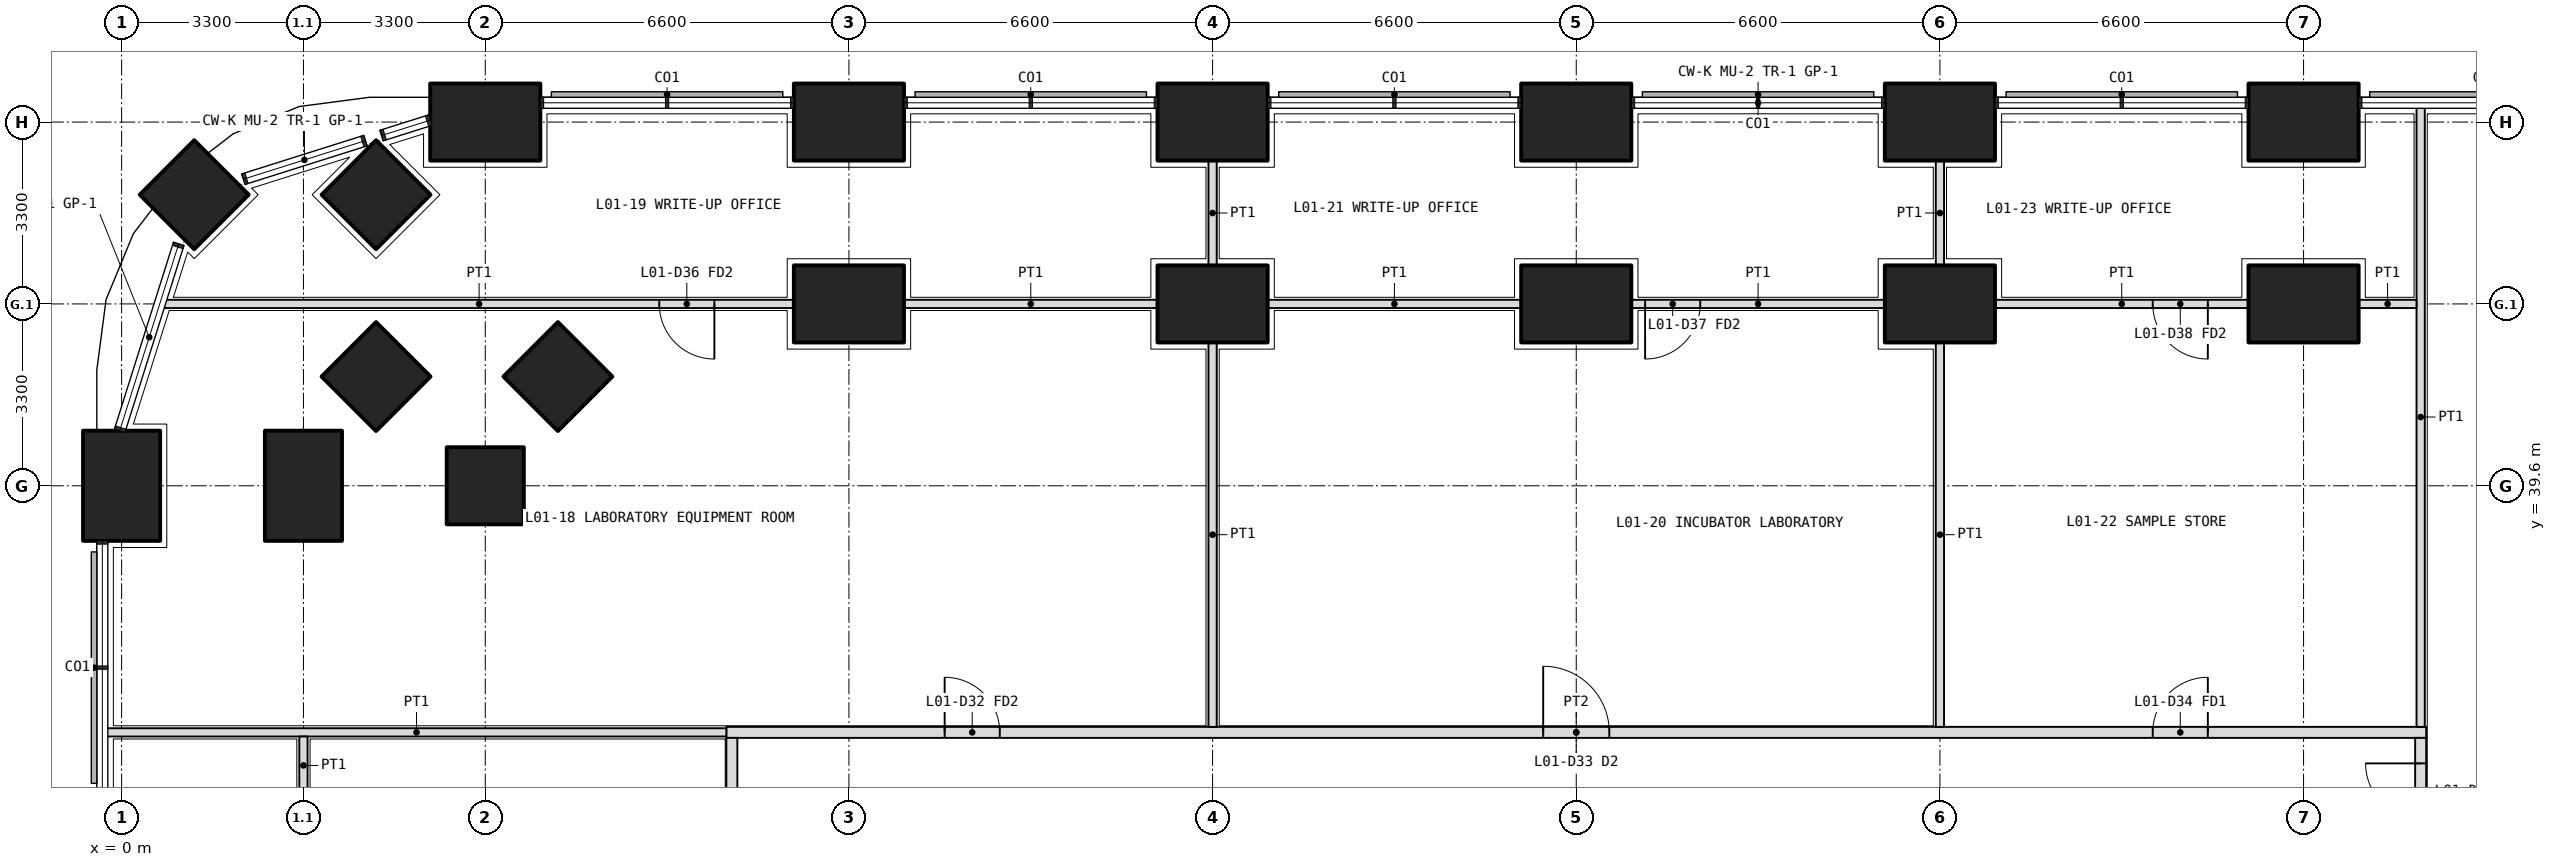
"""IFC4 building model, lengths in metres.
Left out: names, types, materials, properties, quantities, classifications, styles, units other than length and angle.
Written with IfcOpenShell. Run it as: python <this file> out.ifc"""

import sys

from ifc_helpers import new_model, si_unit, direction, frame, frame_2d, origin, origin_2d, place, context, subcontext, project, spatial, rectangle, extrude, element, fill, save


model = new_model("IFC4")
c1 = context("Model", 3, precision=1e-05, world=origin(), true_north=direction((0.0, 1.0)))
c2 = subcontext(c1, "Body", "Model", "MODEL_VIEW")
j1 = project(units=[si_unit("LENGTHUNIT", "METRE"), si_unit("PLANEANGLEUNIT", "RADIAN")], contexts=[c1])
p1 = place(None, origin())
s1 = spatial("IfcSite", under=j1, at=p1, CompositionType="ELEMENT")
p2 = place(p1, origin())
s2 = spatial("IfcBuilding", under=s1, at=p2, CompositionType="ELEMENT")
p3 = place(p2, frame((0.0, 0.0, 7.2)))
s3 = spatial("IfcBuildingStorey", under=s2, at=p3, CompositionType="ELEMENT", Elevation=7.2)
p4 = place(p3, frame((1.318, 44.882, 0.0), z_axis=(0.0, 0.0, 1.0), x_axis=(0.707106781187, 0.707106781187, 0.0)))
e1 = element("IfcColumn", 1, at=p4, inside=s3, PredefinedType="COLUMN", context=c2, shape_type="SweptSolid", body=[
    extrude(rectangle(XDim=1.4, YDim=1.4, at=origin_2d()), origin(), (0.0, 0.0, 1.0), 5.4),
])
for number, where, z_axis, x_axis in (
    (2, (0.0, 39.6, 0.0), (0.0, 0.0, 1.0), (0.0, 1.0, 0.0)),
    (3, (6.6, 46.2, 0.0), (0.0, 0.0, 1.0), (1.0, 0.0, 0.0)),
    (4, (13.2, 46.2, 0.0), (0.0, 0.0, 1.0), (1.0, 0.0, 0.0)),
    (5, (19.8, 46.2, 0.0), (0.0, 0.0, 1.0), (1.0, 0.0, 0.0)),
    (6, (26.4, 46.2, 0.0), (0.0, 0.0, 1.0), (1.0, 0.0, 0.0)),
    (7, (33.0, 46.2, 0.0), (0.0, 0.0, 1.0), (1.0, 0.0, 0.0)),
    (8, (39.6, 46.2, 0.0), (0.0, 0.0, 1.0), (1.0, 0.0, 0.0)),
):
    element("IfcColumn", number, at=place(p3, frame(where, z_axis=z_axis, x_axis=x_axis)), inside=s3, PredefinedType="COLUMN", context=c2, shape_type="SweptSolid", body=[
        extrude(rectangle(XDim=2.0, YDim=1.4, at=origin_2d()), origin(), (0.0, 0.0, 1.0), 5.4),
    ])
for number, where, z_axis, x_axis in (
    (9, (6.6, 39.6, 0.0), (0.0, 0.0, 1.0), (1.0, 0.0, 0.0)),
    (10, (4.618, 44.882, 0.0), (0.0, 0.0, 1.0), (0.707, 0.707, 0.0)),
):
    element("IfcColumn", number, at=place(p3, frame(where, z_axis=z_axis, x_axis=x_axis)), inside=s3, PredefinedType="COLUMN", context=c2, shape_type="SweptSolid", body=[
        extrude(rectangle(XDim=1.4, YDim=1.4, at=origin_2d()), origin(), (0.0, 0.0, 1.0), 5.4),
    ])
p5 = place(p3, frame((3.3, 39.6, 0.0), z_axis=(0.0, 0.0, 1.0), x_axis=(0.0, 1.0, 0.0)))
e11 = element("IfcColumn", 11, at=p5, inside=s3, PredefinedType="COLUMN", context=c2, shape_type="SweptSolid", body=[
    extrude(rectangle(XDim=2.0, YDim=1.4, at=origin_2d()), origin(), (0.0, 0.0, 1.0), 5.4),
])
p6 = place(p3, frame((4.618, 41.582, 0.0), z_axis=(0.0, 0.0, 1.0), x_axis=(0.707106781187, 0.707106781187, 0.0)))
e12 = element("IfcColumn", 12, at=p6, inside=s3, PredefinedType="COLUMN", context=c2, shape_type="SweptSolid", body=[
    extrude(rectangle(XDim=1.4, YDim=1.4, at=origin_2d()), origin(), (0.0, 0.0, 1.0), 5.4),
])
for number, where, z_axis, x_axis in (
    (13, (13.2, 42.9, 0.0), (0.0, 0.0, 1.0), (1.0, 0.0, 0.0)),
    (14, (19.8, 42.9, 0.0), (0.0, 0.0, 1.0), (1.0, 0.0, 0.0)),
    (15, (26.4, 42.9, 0.0), (0.0, 0.0, 1.0), (1.0, 0.0, 0.0)),
    (16, (33.0, 42.9, 0.0), (0.0, 0.0, 1.0), (1.0, 0.0, 0.0)),
    (17, (39.6, 42.9, 0.0), (0.0, 0.0, 1.0), (1.0, 0.0, 0.0)),
):
    element("IfcColumn", number, at=place(p3, frame(where, z_axis=z_axis, x_axis=x_axis)), inside=s3, PredefinedType="COLUMN", context=c2, shape_type="SweptSolid", body=[
        extrude(rectangle(XDim=2.0, YDim=1.4, at=origin_2d()), origin(), (0.0, 0.0, 1.0), 5.4),
    ])
p7 = place(p3, frame((7.918, 41.582, 0.0), z_axis=(0.0, 0.0, 1.0), x_axis=(0.707106781187, 0.707106781187, 0.0)))
e18 = element("IfcColumn", 18, at=p7, inside=s3, PredefinedType="COLUMN", context=c2, shape_type="SweptSolid", body=[
    extrude(rectangle(XDim=1.4, YDim=1.4, at=origin_2d()), origin(), (0.0, 0.0, 1.0), 5.4),
])
p8 = place(p3, frame((10.975, 35.125, 0.0), z_axis=(0.0, 0.0, 1.0), x_axis=(1.0, 0.0, 0.0)))
e19 = element("IfcWall", 19, at=p8, inside=s3, PredefinedType="PARTITIONING", context=c2, shape_type="SweptSolid", body=[
    extrude(rectangle(XDim=30.85, YDim=0.2, at=frame_2d((15.425, 0.0))), origin(), (0.0, 0.0, 1.0), 4.05),
])
p9 = place(p8, frame((3.962, 0.0, 0.0)))
e20 = element("IfcOpeningElement", 20, at=p9, cuts=e19, PredefinedType="OPENING", context=c2, shape_type="SweptSolid", body=[
    extrude(rectangle(XDim=1.0, YDim=2.1, at=frame_2d((0.5, 1.05))), frame((0.0, 0.11, 0.0), z_axis=(0.0, -1.0, 0.0), x_axis=(1.0, 0.0, 0.0)), (0.0, 0.0, 1.0), 0.22),
])
p10 = place(p8, frame((14.825, 0.0, 0.0)))
e21 = element("IfcOpeningElement", 21, at=p10, cuts=e19, PredefinedType="OPENING", context=c2, shape_type="SweptSolid", body=[
    extrude(rectangle(XDim=1.2, YDim=2.1, at=frame_2d((0.6, 1.05))), frame((0.0, 0.11, 0.0), z_axis=(0.0, -1.0, 0.0), x_axis=(1.0, 0.0, 0.0)), (0.0, 0.0, 1.0), 0.22),
])
p11 = place(p8, frame((25.887, 0.0, 0.0)))
e22 = element("IfcOpeningElement", 22, at=p11, cuts=e19, PredefinedType="OPENING", context=c2, shape_type="SweptSolid", body=[
    extrude(rectangle(XDim=1.0, YDim=2.1, at=frame_2d((0.5, 1.05))), frame((0.0, 0.11, 0.0), z_axis=(0.0, -1.0, 0.0), x_axis=(1.0, 0.0, 0.0)), (0.0, 0.0, 1.0), 0.22),
])
p12 = place(p3, frame((11.075, 26.4, 0.0), z_axis=(0.0, 0.0, 1.0), x_axis=(0.0, 1.0, 0.0)))
e23 = element("IfcWall", 23, at=p12, inside=s3, PredefinedType="PARTITIONING", context=c2, shape_type="SweptSolid", body=[
    extrude(rectangle(XDim=8.625, YDim=0.2, at=frame_2d((4.312, 0.0))), origin(), (0.0, 0.0, 1.0), 4.05),
])
p13 = place(p12, frame((3.863, 0.0, 0.0)))
e24 = element("IfcOpeningElement", 24, at=p13, cuts=e23, PredefinedType="OPENING", context=c2, shape_type="SweptSolid", body=[
    extrude(rectangle(XDim=1.0, YDim=2.1, at=frame_2d((0.5, 1.05))), frame((0.0, 0.11, 0.0), z_axis=(0.0, -1.0, 0.0), x_axis=(1.0, 0.0, 0.0)), (0.0, 0.0, 1.0), 0.22),
])
p14 = place(p3, frame((41.725, 11.175, 0.0), z_axis=(0.0, 0.0, 1.0), x_axis=(0.0, 1.0, 0.0)))
e25 = element("IfcWall", 25, at=p14, inside=s3, PredefinedType="PARTITIONING", context=c2, shape_type="SweptSolid", body=[
    extrude(rectangle(XDim=23.85, YDim=0.2, at=frame_2d((11.925, 0.0))), origin(), (0.0, 0.0, 1.0), 4.05),
])
p15 = place(p14, frame((3.663, 0.0, 0.0)))
e26 = element("IfcOpeningElement", 26, at=p15, cuts=e25, PredefinedType="OPENING", context=c2, shape_type="SweptSolid", body=[
    extrude(rectangle(XDim=1.2, YDim=2.1, at=frame_2d((0.6, 1.05))), frame((0.0, 0.11, 0.0), z_axis=(0.0, -1.0, 0.0), x_axis=(1.0, 0.0, 0.0)), (0.0, 0.0, 1.0), 0.22),
])
p16 = place(p14, frame((9.625, 0.0, 0.0)))
e27 = element("IfcOpeningElement", 27, at=p16, cuts=e25, PredefinedType="OPENING", context=c2, shape_type="SweptSolid", body=[
    extrude(rectangle(XDim=1.0, YDim=2.1, at=frame_2d((0.5, 1.05))), frame((0.0, 0.11, 0.0), z_axis=(0.0, -1.0, 0.0), x_axis=(1.0, 0.0, 0.0)), (0.0, 0.0, 1.0), 0.22),
])
p17 = place(p14, frame((12.975, 0.0, 0.0)))
e28 = element("IfcOpeningElement", 28, at=p17, cuts=e25, PredefinedType="OPENING", context=c2, shape_type="SweptSolid", body=[
    extrude(rectangle(XDim=0.9, YDim=2.1, at=frame_2d((0.45, 1.05))), frame((0.0, 0.11, 0.0), z_axis=(0.0, -1.0, 0.0), x_axis=(1.0, 0.0, 0.0)), (0.0, 0.0, 1.0), 0.22),
])
p18 = place(p14, frame((18.025, 0.0, 0.0)))
e29 = element("IfcOpeningElement", 29, at=p18, cuts=e25, PredefinedType="OPENING", context=c2, shape_type="SweptSolid", body=[
    extrude(rectangle(XDim=1.0, YDim=2.1, at=frame_2d((0.5, 1.05))), frame((0.0, 0.11, 0.0), z_axis=(0.0, -1.0, 0.0), x_axis=(1.0, 0.0, 0.0)), (0.0, 0.0, 1.0), 0.22),
])
p19 = place(p14, frame((22.387, 0.0, 0.0)))
e30 = element("IfcOpeningElement", 30, at=p19, cuts=e25, PredefinedType="OPENING", context=c2, shape_type="SweptSolid", body=[
    extrude(rectangle(XDim=1.0, YDim=2.1, at=frame_2d((0.5, 1.05))), frame((0.0, 0.11, 0.0), z_axis=(0.0, -1.0, 0.0), x_axis=(1.0, 0.0, 0.0)), (0.0, 0.0, 1.0), 0.22),
])
p20 = place(p3, frame((41.725, 46.47, 0.0), z_axis=(0.0, 0.0, 1.0), x_axis=(0.0, -1.0, 0.0)))
e31 = element("IfcWall", 31, at=p20, inside=s3, PredefinedType="PARTITIONING", context=c2, shape_type="SweptSolid", body=[
    extrude(rectangle(XDim=11.245, YDim=0.15, at=frame_2d((5.623, 0.0))), origin(), (0.0, 0.0, 1.0), 3.9),
])
p21 = place(p3, frame((-0.27, 35.125, 0.0), z_axis=(0.0, 0.0, 1.0), x_axis=(1.0, 0.0, 0.0)))
e32 = element("IfcWall", 32, at=p21, inside=s3, PredefinedType="PARTITIONING", context=c2, shape_type="SweptSolid", body=[
    extrude(rectangle(XDim=11.245, YDim=0.15, at=frame_2d((5.623, 0.0))), origin(), (0.0, 0.0, 1.0), 3.9),
])
p22 = place(p3, frame((41.65, 42.9, 0.0), z_axis=(0.0, 0.0, 1.0), x_axis=(-1.0, 0.0, 0.0)))
e33 = element("IfcWall", 33, at=p22, inside=s3, PredefinedType="PARTITIONING", context=c2, shape_type="SweptSolid", body=[
    extrude(rectangle(XDim=1.05, YDim=0.15, at=frame_2d((0.525, 0.0))), origin(), (0.0, 0.0, 1.0), 5.1),
])
p23 = place(p3, frame((38.6, 42.9, 0.0), z_axis=(0.0, 0.0, 1.0), x_axis=(-1.0, 0.0, 0.0)))
e34 = element("IfcWall", 34, at=p23, inside=s3, PredefinedType="PARTITIONING", context=c2, shape_type="SweptSolid", body=[
    extrude(rectangle(XDim=4.6, YDim=0.15, at=frame_2d((2.3, 0.0))), origin(), (0.0, 0.0, 1.0), 5.1),
])
p24 = place(p23, frame((0.738, 0.0, 0.0)))
e35 = element("IfcOpeningElement", 35, at=p24, cuts=e34, PredefinedType="OPENING", context=c2, shape_type="SweptSolid", body=[
    extrude(rectangle(XDim=1.0, YDim=2.1, at=frame_2d((0.5, 1.05))), frame((0.0, 0.085, 0.0), z_axis=(0.0, -1.0, 0.0), x_axis=(1.0, 0.0, 0.0)), (0.0, 0.0, 1.0), 0.17),
])
p25 = place(p3, frame((32.0, 42.9, 0.0), z_axis=(0.0, 0.0, 1.0), x_axis=(-1.0, 0.0, 0.0)))
e36 = element("IfcWall", 36, at=p25, inside=s3, PredefinedType="PARTITIONING", context=c2, shape_type="SweptSolid", body=[
    extrude(rectangle(XDim=4.6, YDim=0.15, at=frame_2d((2.3, 0.0))), origin(), (0.0, 0.0, 1.0), 5.1),
])
p26 = place(p25, frame((3.35, 0.0, 0.0)))
e37 = element("IfcOpeningElement", 37, at=p26, cuts=e36, PredefinedType="OPENING", context=c2, shape_type="SweptSolid", body=[
    extrude(rectangle(XDim=1.0, YDim=2.1, at=frame_2d((0.5, 1.05))), frame((0.0, 0.085, 0.0), z_axis=(0.0, -1.0, 0.0), x_axis=(1.0, 0.0, 0.0)), (0.0, 0.0, 1.0), 0.17),
])
p27 = place(p3, frame((25.4, 42.9, 0.0), z_axis=(0.0, 0.0, 1.0), x_axis=(-1.0, 0.0, 0.0)))
e38 = element("IfcWall", 38, at=p27, inside=s3, PredefinedType="PARTITIONING", context=c2, shape_type="SweptSolid", body=[
    extrude(rectangle(XDim=4.6, YDim=0.15, at=frame_2d((2.3, 0.0))), origin(), (0.0, 0.0, 1.0), 5.1),
])
p28 = place(p3, frame((18.8, 42.9, 0.0), z_axis=(0.0, 0.0, 1.0), x_axis=(-1.0, 0.0, 0.0)))
e39 = element("IfcWall", 39, at=p28, inside=s3, PredefinedType="PARTITIONING", context=c2, shape_type="SweptSolid", body=[
    extrude(rectangle(XDim=4.6, YDim=0.15, at=frame_2d((2.3, 0.0))), origin(), (0.0, 0.0, 1.0), 5.1),
])
p29 = place(p3, frame((12.2, 42.9, 0.0), z_axis=(0.0, 0.0, 1.0), x_axis=(-1.0, 0.0, 0.0)))
e40 = element("IfcWall", 40, at=p29, inside=s3, PredefinedType="PARTITIONING", context=c2, shape_type="SweptSolid", body=[
    extrude(rectangle(XDim=11.424, YDim=0.15, at=frame_2d((5.712, 0.0))), origin(), (0.0, 0.0, 1.0), 3.9),
])
p30 = place(p29, frame((1.442, 0.0, 0.0)))
e41 = element("IfcOpeningElement", 41, at=p30, cuts=e40, PredefinedType="OPENING", context=c2, shape_type="SweptSolid", body=[
    extrude(rectangle(XDim=1.0, YDim=2.1, at=frame_2d((0.5, 1.05))), frame((0.0, 0.085, 0.0), z_axis=(0.0, -1.0, 0.0), x_axis=(1.0, 0.0, 0.0)), (0.0, 0.0, 1.0), 0.17),
])
p31 = place(p3, frame((19.8, 45.5, 0.0), z_axis=(0.0, 0.0, 1.0), x_axis=(0.0, -1.0, 0.0)))
e42 = element("IfcWall", 42, at=p31, inside=s3, PredefinedType="PARTITIONING", context=c2, shape_type="SweptSolid", body=[
    extrude(rectangle(XDim=1.9, YDim=0.15, at=frame_2d((0.95, 0.0))), origin(), (0.0, 0.0, 1.0), 4.05),
])
p32 = place(p3, frame((19.8, 42.2, 0.0), z_axis=(0.0, 0.0, 1.0), x_axis=(0.0, -1.0, 0.0)))
e43 = element("IfcWall", 43, at=p32, inside=s3, PredefinedType="PARTITIONING", context=c2, shape_type="SweptSolid", body=[
    extrude(rectangle(XDim=6.975, YDim=0.15, at=frame_2d((3.487, 0.0))), origin(), (0.0, 0.0, 1.0), 4.05),
])
p33 = place(p3, frame((33.0, 45.5, 0.0), z_axis=(0.0, 0.0, 1.0), x_axis=(0.0, -1.0, 0.0)))
e44 = element("IfcWall", 44, at=p33, inside=s3, PredefinedType="PARTITIONING", context=c2, shape_type="SweptSolid", body=[
    extrude(rectangle(XDim=1.9, YDim=0.15, at=frame_2d((0.95, 0.0))), origin(), (0.0, 0.0, 1.0), 4.05),
])
p34 = place(p3, frame((33.0, 42.2, 0.0), z_axis=(0.0, 0.0, 1.0), x_axis=(0.0, -1.0, 0.0)))
e45 = element("IfcWall", 45, at=p34, inside=s3, PredefinedType="PARTITIONING", context=c2, shape_type="SweptSolid", body=[
    extrude(rectangle(XDim=6.975, YDim=0.15, at=frame_2d((3.487, 0.0))), origin(), (0.0, 0.0, 1.0), 4.05),
])
p35 = place(p3, frame((3.3, 35.05, 0.0), z_axis=(0.0, 0.0, 1.0), x_axis=(0.0, -1.0, 0.0)))
e46 = element("IfcWall", 46, at=p35, inside=s3, PredefinedType="PARTITIONING", context=c2, shape_type="SweptSolid", body=[
    extrude(rectangle(XDim=1.05, YDim=0.15, at=frame_2d((0.525, 0.0))), origin(), (0.0, 0.0, 1.0), 5.1),
])
p36 = place(p19, origin())
e47 = element("IfcDoor", 47, at=p36, inside=s3, OperationType="SINGLE_SWING_RIGHT", PredefinedType="DOOR", context=c2, shape_type="SweptSolid", body=[
    extrude(rectangle(XDim=1.0, YDim=2.1, at=frame_2d((0.5, 1.05))), frame((0.0, 0.025, 0.0), z_axis=(0.0, -1.0, 0.0), x_axis=(1.0, 0.0, 0.0)), (0.0, 0.0, 1.0), 0.05),
])
fill(e30, e47)
p37 = place(p9, origin())
e48 = element("IfcDoor", 48, at=p37, inside=s3, OperationType="SINGLE_SWING_LEFT", PredefinedType="DOOR", context=c2, shape_type="SweptSolid", body=[
    extrude(rectangle(XDim=1.0, YDim=2.1, at=frame_2d((0.5, 1.05))), frame((0.0, 0.025, 0.0), z_axis=(0.0, -1.0, 0.0), x_axis=(1.0, 0.0, 0.0)), (0.0, 0.0, 1.0), 0.05),
])
fill(e20, e48)
p38 = place(p30, origin())
e49 = element("IfcDoor", 49, at=p38, inside=s3, OperationType="SINGLE_SWING_LEFT", PredefinedType="DOOR", context=c2, shape_type="SweptSolid", body=[
    extrude(rectangle(XDim=1.0, YDim=2.1, at=frame_2d((0.5, 1.05))), frame((0.0, 0.025, 0.0), z_axis=(0.0, -1.0, 0.0), x_axis=(1.0, 0.0, 0.0)), (0.0, 0.0, 1.0), 0.05),
])
fill(e41, e49)
p39 = place(p10, origin())
e50 = element("IfcDoor", 50, at=p39, inside=s3, OperationType="DOUBLE_DOOR_SINGLE_SWING", PredefinedType="DOOR", context=c2, shape_type="SweptSolid", body=[
    extrude(rectangle(XDim=1.2, YDim=2.1, at=frame_2d((0.6, 1.05))), frame((0.0, 0.025, 0.0), z_axis=(0.0, -1.0, 0.0), x_axis=(1.0, 0.0, 0.0)), (0.0, 0.0, 1.0), 0.05),
])
fill(e21, e50)
p40 = place(p26, origin())
e51 = element("IfcDoor", 51, at=p40, inside=s3, OperationType="SINGLE_SWING_RIGHT", PredefinedType="DOOR", context=c2, shape_type="SweptSolid", body=[
    extrude(rectangle(XDim=1.0, YDim=2.1, at=frame_2d((0.5, 1.05))), frame((0.0, 0.025, 0.0), z_axis=(0.0, -1.0, 0.0), x_axis=(1.0, 0.0, 0.0)), (0.0, 0.0, 1.0), 0.05),
])
fill(e37, e51)
p41 = place(p11, origin())
e52 = element("IfcDoor", 52, at=p41, inside=s3, OperationType="SINGLE_SWING_RIGHT", PredefinedType="DOOR", context=c2, shape_type="SweptSolid", body=[
    extrude(rectangle(XDim=1.0, YDim=2.1, at=frame_2d((0.5, 1.05))), frame((0.0, 0.025, 0.0), z_axis=(0.0, -1.0, 0.0), x_axis=(1.0, 0.0, 0.0)), (0.0, 0.0, 1.0), 0.05),
])
fill(e22, e52)
p42 = place(p24, origin())
e53 = element("IfcDoor", 53, at=p42, inside=s3, OperationType="SINGLE_SWING_LEFT", PredefinedType="DOOR", context=c2, shape_type="SweptSolid", body=[
    extrude(rectangle(XDim=1.0, YDim=2.1, at=frame_2d((0.5, 1.05))), frame((0.0, 0.025, 0.0), z_axis=(0.0, -1.0, 0.0), x_axis=(1.0, 0.0, 0.0)), (0.0, 0.0, 1.0), 0.05),
])
fill(e35, e53)
save(model, sys.argv[1])
